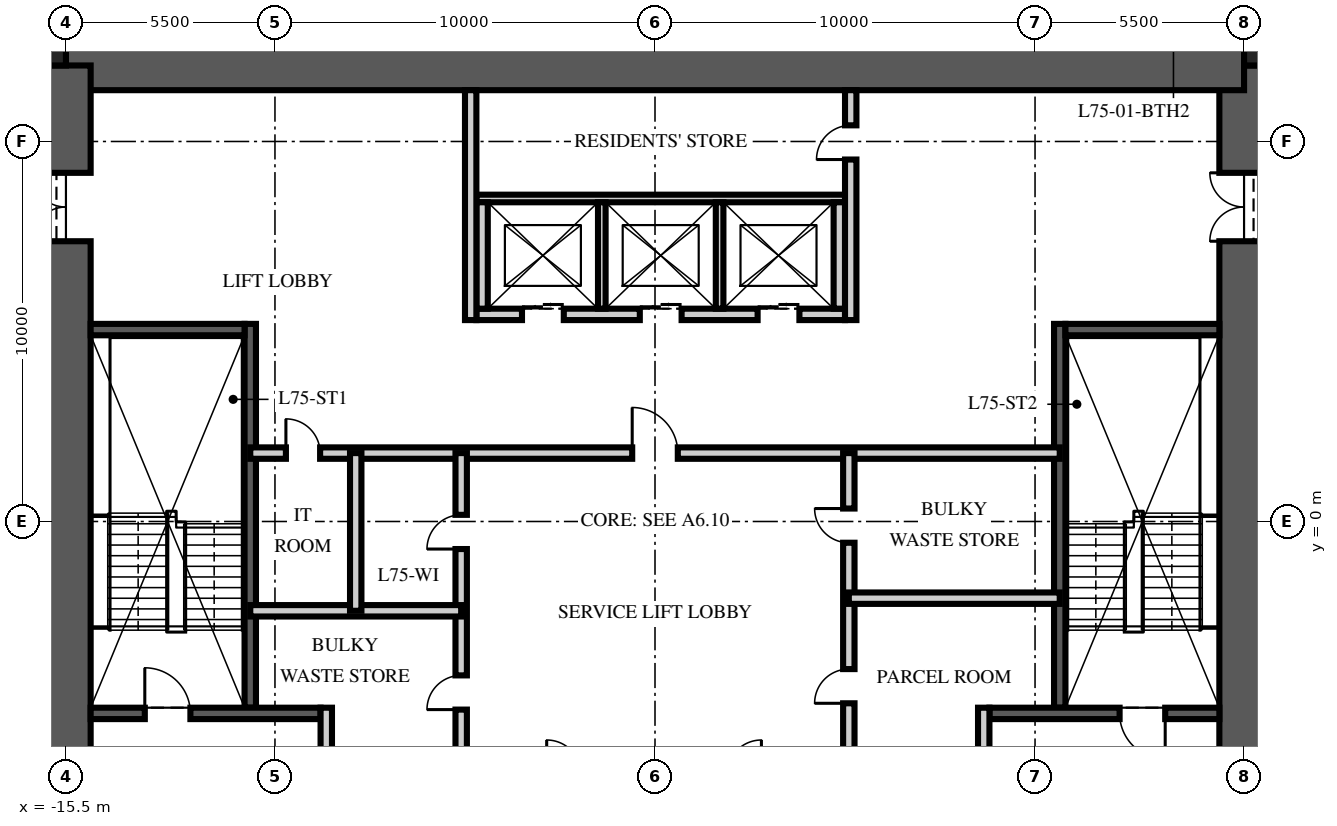
"""IFC4 building model, lengths in metres.
Left out: names, types, materials, properties, quantities, classifications, styles, units other than length and angle.
Written with IfcOpenShell. Run it as: python <this file> out.ifc"""

import sys

from ifc_helpers import new_model, si_unit, direction, frame, frame_2d, origin, origin_2d, place, context, subcontext, project, spatial, rectangle, extrude, element, fill, save


model = new_model("IFC4")
c1 = context("Model", 3, precision=1e-05, world=origin(), true_north=direction((0.0, 1.0)))
c2 = subcontext(c1, "Body", "Model", "MODEL_VIEW")
j1 = project(units=[si_unit("LENGTHUNIT", "METRE"), si_unit("PLANEANGLEUNIT", "RADIAN")], contexts=[c1])
p1 = place(None, origin())
s1 = spatial("IfcSite", under=j1, at=p1, CompositionType="ELEMENT")
p2 = place(p1, origin())
s2 = spatial("IfcBuilding", under=s1, at=p2, CompositionType="ELEMENT")
p3 = place(p2, frame((0.0, 0.0, 300.75)))
s3 = spatial("IfcBuildingStorey", under=s2, at=p3, CompositionType="ELEMENT", Elevation=300.75)
p4 = place(p3, frame((15.5, -12.0, -0.25), z_axis=(0.0, 0.0, 1.0), x_axis=(0.0, 1.0, 0.0)))
e1 = element("IfcWall", 1, at=p4, inside=s3, PredefinedType="SHEAR", context=c2, shape_type="SweptSolid", body=[
    extrude(rectangle(XDim=24.0, YDim=1.3, at=frame_2d((12.0, 0.0))), origin(), (0.0, 0.0, 1.0), 3.75),
])
p5 = place(p4, frame((3.125, 0.0, 0.25)))
e2 = element("IfcOpeningElement", 2, at=p5, cuts=e1, PredefinedType="OPENING", context=c2, shape_type="SweptSolid", body=[
    extrude(rectangle(XDim=1.2, YDim=2.1, at=frame_2d((0.6, 1.05))), frame((0.0, 0.66, 0.0), z_axis=(0.0, -1.0, 0.0), x_axis=(1.0, 0.0, 0.0)), (0.0, 0.0, 1.0), 1.32),
])
p6 = place(p4, frame((19.375, 0.0, 0.25)))
e3 = element("IfcOpeningElement", 3, at=p6, cuts=e1, PredefinedType="OPENING", context=c2, shape_type="SweptSolid", body=[
    extrude(rectangle(XDim=1.8, YDim=2.1, at=frame_2d((0.9, 1.05))), frame((0.0, 0.66, 0.0), z_axis=(0.0, -1.0, 0.0), x_axis=(1.0, 0.0, 0.0)), (0.0, 0.0, 1.0), 1.32),
])
p7 = place(p3, frame((-15.5, 12.0, -0.25), z_axis=(0.0, 0.0, 1.0), x_axis=(1.0, 0.0, 0.0)))
e4 = element("IfcWall", 4, at=p7, inside=s3, PredefinedType="SHEAR", context=c2, shape_type="SweptSolid", body=[
    extrude(rectangle(XDim=31.0, YDim=1.3, at=frame_2d((15.5, 0.0))), origin(), (0.0, 0.0, 1.0), 3.75),
])
p8 = place(p3, frame((-15.5, -12.0, -0.25), z_axis=(0.0, 0.0, 1.0), x_axis=(0.0, 1.0, 0.0)))
e5 = element("IfcWall", 5, at=p8, inside=s3, PredefinedType="SHEAR", context=c2, shape_type="SweptSolid", body=[
    extrude(rectangle(XDim=24.0, YDim=1.3, at=frame_2d((12.0, 0.0))), origin(), (0.0, 0.0, 1.0), 3.75),
])
p9 = place(p8, frame((3.125, 0.0, 0.25)))
e6 = element("IfcOpeningElement", 6, at=p9, cuts=e5, PredefinedType="OPENING", context=c2, shape_type="SweptSolid", body=[
    extrude(rectangle(XDim=1.2, YDim=2.1, at=frame_2d((0.6, 1.05))), frame((0.0, 0.66, 0.0), z_axis=(0.0, -1.0, 0.0), x_axis=(1.0, 0.0, 0.0)), (0.0, 0.0, 1.0), 1.32),
])
p10 = place(p8, frame((19.375, 0.0, 0.25)))
e7 = element("IfcOpeningElement", 7, at=p10, cuts=e5, PredefinedType="OPENING", context=c2, shape_type="SweptSolid", body=[
    extrude(rectangle(XDim=1.8, YDim=2.1, at=frame_2d((0.9, 1.05))), frame((0.0, 0.66, 0.0), z_axis=(0.0, -1.0, 0.0), x_axis=(1.0, 0.0, 0.0)), (0.0, 0.0, 1.0), 1.32),
])
for number, where, z_axis, x_axis in (
    (8, (15.825, 12.325, -0.25), (0.0, 0.0, 1.0), (1.0, 0.0, 0.0)),
    (9, (-15.825, 12.325, -0.25), (0.0, 0.0, 1.0), (1.0, 0.0, 0.0)),
):
    element("IfcColumn", number, at=place(p3, frame(where, z_axis=z_axis, x_axis=x_axis)), inside=s3, PredefinedType="COLUMN", context=c2, shape_type="SweptSolid", body=[
        extrude(rectangle(XDim=0.65, YDim=0.65, at=origin_2d()), origin(), (0.0, 0.0, 1.0), 3.75),
    ])
p11 = place(p3, frame((-10.65, -4.9, 0.0), z_axis=(0.0, 0.0, 1.0), x_axis=(0.0, 1.0, 0.0)))
e10 = element("IfcWall", 10, at=p11, inside=s3, PredefinedType="SOLIDWALL", context=c2, shape_type="SweptSolid", body=[
    extrude(rectangle(XDim=10.1, YDim=0.3, at=frame_2d((5.05, 0.0))), origin(), (0.0, 0.0, 1.0), 3.5),
])
p12 = place(p3, frame((-14.85, -5.05, 0.0), z_axis=(0.0, 0.0, 1.0), x_axis=(1.0, 0.0, 0.0)))
e11 = element("IfcWall", 11, at=p12, inside=s3, PredefinedType="SOLIDWALL", context=c2, shape_type="SweptSolid", body=[
    extrude(rectangle(XDim=6.05, YDim=0.3, at=frame_2d((3.025, 0.0))), origin(), (0.0, 0.0, 1.0), 3.5),
])
p13 = place(p12, frame((1.425, 0.0, 0.0)))
e12 = element("IfcOpeningElement", 12, at=p13, cuts=e11, PredefinedType="OPENING", context=c2, shape_type="SweptSolid", body=[
    extrude(rectangle(XDim=1.2, YDim=2.1, at=frame_2d((0.6, 1.05))), frame((0.0, 0.16, 0.0), z_axis=(0.0, -1.0, 0.0), x_axis=(1.0, 0.0, 0.0)), (0.0, 0.0, 1.0), 0.32),
])
p14 = place(p3, frame((-14.85, 5.05, 0.0), z_axis=(0.0, 0.0, 1.0), x_axis=(1.0, 0.0, 0.0)))
e13 = element("IfcWall", 13, at=p14, inside=s3, PredefinedType="SOLIDWALL", context=c2, shape_type="SweptSolid", body=[
    extrude(rectangle(XDim=4.05, YDim=0.3, at=frame_2d((2.025, 0.0))), origin(), (0.0, 0.0, 1.0), 3.5),
])
p15 = place(p3, frame((-8.65, -11.35, 0.0), z_axis=(0.0, 0.0, 1.0), x_axis=(0.0, 1.0, 0.0)))
e14 = element("IfcWall", 14, at=p15, inside=s3, PredefinedType="PARTITIONING", context=c2, shape_type="SweptSolid", body=[
    extrude(rectangle(XDim=6.45, YDim=0.3, at=frame_2d((3.225, 0.0))), origin(), (0.0, 0.0, 1.0), 3.5),
])
p16 = place(p15, frame((2.6, 0.0, 0.0)))
e15 = element("IfcOpeningElement", 15, at=p16, cuts=e14, PredefinedType="OPENING", context=c2, shape_type="SweptSolid", body=[
    extrude(rectangle(XDim=1.1, YDim=2.1, at=frame_2d((0.55, 1.05))), frame((0.0, 0.16, 0.0), z_axis=(0.0, -1.0, 0.0), x_axis=(1.0, 0.0, 0.0)), (0.0, 0.0, 1.0), 0.32),
])
p17 = place(p3, frame((10.65, -4.9, 0.0), z_axis=(0.0, 0.0, 1.0), x_axis=(0.0, 1.0, 0.0)))
e16 = element("IfcWall", 16, at=p17, inside=s3, PredefinedType="SOLIDWALL", context=c2, shape_type="SweptSolid", body=[
    extrude(rectangle(XDim=10.1, YDim=0.3, at=frame_2d((5.05, 0.0))), origin(), (0.0, 0.0, 1.0), 3.5),
])
p18 = place(p3, frame((14.85, -5.05, 0.0), z_axis=(0.0, 0.0, 1.0), x_axis=(-1.0, 0.0, 0.0)))
e17 = element("IfcWall", 17, at=p18, inside=s3, PredefinedType="SOLIDWALL", context=c2, shape_type="SweptSolid", body=[
    extrude(rectangle(XDim=6.05, YDim=0.3, at=frame_2d((3.025, 0.0))), origin(), (0.0, 0.0, 1.0), 3.5),
])
p19 = place(p18, frame((1.425, 0.0, 0.0)))
e18 = element("IfcOpeningElement", 18, at=p19, cuts=e17, PredefinedType="OPENING", context=c2, shape_type="SweptSolid", body=[
    extrude(rectangle(XDim=1.2, YDim=2.1, at=frame_2d((0.6, 1.05))), frame((0.0, 0.16, 0.0), z_axis=(0.0, -1.0, 0.0), x_axis=(1.0, 0.0, 0.0)), (0.0, 0.0, 1.0), 0.32),
])
p20 = place(p3, frame((14.85, 5.05, 0.0), z_axis=(0.0, 0.0, 1.0), x_axis=(-1.0, 0.0, 0.0)))
e19 = element("IfcWall", 19, at=p20, inside=s3, PredefinedType="SOLIDWALL", context=c2, shape_type="SweptSolid", body=[
    extrude(rectangle(XDim=4.05, YDim=0.3, at=frame_2d((2.025, 0.0))), origin(), (0.0, 0.0, 1.0), 3.5),
])
p21 = place(p3, frame((8.65, -11.35, 0.0), z_axis=(0.0, 0.0, 1.0), x_axis=(0.0, 1.0, 0.0)))
e20 = element("IfcWall", 20, at=p21, inside=s3, PredefinedType="PARTITIONING", context=c2, shape_type="SweptSolid", body=[
    extrude(rectangle(XDim=6.45, YDim=0.3, at=frame_2d((3.225, 0.0))), origin(), (0.0, 0.0, 1.0), 3.5),
])
p22 = place(p21, frame((2.6, 0.0, 0.0)))
e21 = element("IfcOpeningElement", 21, at=p22, cuts=e20, PredefinedType="OPENING", context=c2, shape_type="SweptSolid", body=[
    extrude(rectangle(XDim=1.1, YDim=2.1, at=frame_2d((0.55, 1.05))), frame((0.0, 0.16, 0.0), z_axis=(0.0, -1.0, 0.0), x_axis=(1.0, 0.0, 0.0)), (0.0, 0.0, 1.0), 0.32),
])
p23 = place(p3, frame((-4.7, 5.45, 0.0), z_axis=(0.0, 0.0, 1.0), x_axis=(1.0, 0.0, 0.0)))
e22 = element("IfcWall", 22, at=p23, inside=s3, PredefinedType="PARTITIONING", context=c2, shape_type="SweptSolid", body=[
    extrude(rectangle(XDim=9.7, YDim=0.3, at=frame_2d((4.85, 0.0))), origin(), (0.0, 0.0, 1.0), 3.5),
])
p24 = place(p23, frame((1.2, 0.0, 0.0)))
e23 = element("IfcOpeningElement", 23, at=p24, cuts=e22, PredefinedType="OPENING", context=c2, shape_type="SweptSolid", body=[
    extrude(rectangle(XDim=1.1, YDim=2.1, at=frame_2d((0.55, 1.05))), frame((0.0, 0.16, 0.0), z_axis=(0.0, -1.0, 0.0), x_axis=(1.0, 0.0, 0.0)), (0.0, 0.0, 1.0), 0.32),
])
p25 = place(p23, frame((4.3, 0.0, 0.0)))
e24 = element("IfcOpeningElement", 24, at=p25, cuts=e22, PredefinedType="OPENING", context=c2, shape_type="SweptSolid", body=[
    extrude(rectangle(XDim=1.1, YDim=2.1, at=frame_2d((0.55, 1.05))), frame((0.0, 0.16, 0.0), z_axis=(0.0, -1.0, 0.0), x_axis=(1.0, 0.0, 0.0)), (0.0, 0.0, 1.0), 0.32),
])
p26 = place(p23, frame((7.4, 0.0, 0.0)))
e25 = element("IfcOpeningElement", 25, at=p26, cuts=e22, PredefinedType="OPENING", context=c2, shape_type="SweptSolid", body=[
    extrude(rectangle(XDim=1.1, YDim=2.1, at=frame_2d((0.55, 1.05))), frame((0.0, 0.16, 0.0), z_axis=(0.0, -1.0, 0.0), x_axis=(1.0, 0.0, 0.0)), (0.0, 0.0, 1.0), 0.32),
])
p27 = place(p3, frame((-4.7, 8.5, 0.0), z_axis=(0.0, 0.0, 1.0), x_axis=(1.0, 0.0, 0.0)))
e26 = element("IfcWall", 26, at=p27, inside=s3, PredefinedType="PARTITIONING", context=c2, shape_type="SweptSolid", body=[
    extrude(rectangle(XDim=9.7, YDim=0.2, at=frame_2d((4.85, 0.0))), origin(), (0.0, 0.0, 1.0), 3.5),
])
for number, where, z_axis, x_axis in (
    (27, (-4.55, 5.6, 0.0), (0.0, 0.0, 1.0), (0.0, 1.0, 0.0)),
    (28, (4.85, 5.6, 0.0), (0.0, 0.0, 1.0), (0.0, 1.0, 0.0)),
):
    element("IfcWall", number, at=place(p3, frame(where, z_axis=z_axis, x_axis=x_axis)), inside=s3, PredefinedType="PARTITIONING", context=c2, shape_type="SweptSolid", body=[
        extrude(rectangle(XDim=2.8, YDim=0.3, at=frame_2d((1.4, 0.0))), origin(), (0.0, 0.0, 1.0), 3.5),
    ])
for number, where, z_axis, x_axis in (
    (29, (-1.4, 5.6, 0.0), (0.0, 0.0, 1.0), (0.0, 1.0, 0.0)),
    (30, (1.7, 5.6, 0.0), (0.0, 0.0, 1.0), (0.0, 1.0, 0.0)),
):
    element("IfcWall", number, at=place(p3, frame(where, z_axis=z_axis, x_axis=x_axis)), inside=s3, PredefinedType="PARTITIONING", context=c2, shape_type="SweptSolid", body=[
        extrude(rectangle(XDim=2.8, YDim=0.2, at=frame_2d((1.4, 0.0))), origin(), (0.0, 0.0, 1.0), 3.5),
    ])
p28 = place(p3, frame((-10.65, 1.8, 0.0), z_axis=(0.0, 0.0, 1.0), x_axis=(1.0, 0.0, 0.0)))
e31 = element("IfcWall", 31, at=p28, inside=s3, PredefinedType="PARTITIONING", context=c2, shape_type="SweptSolid", body=[
    extrude(rectangle(XDim=21.3, YDim=0.3, at=frame_2d((10.65, 0.0))), origin(), (0.0, 0.0, 1.0), 3.5),
])
p29 = place(p28, frame((10.05, 0.0, 0.0)))
e32 = element("IfcOpeningElement", 32, at=p29, cuts=e31, PredefinedType="OPENING", context=c2, shape_type="SweptSolid", body=[
    extrude(rectangle(XDim=1.2, YDim=2.1, at=frame_2d((0.6, 1.05))), frame((0.0, 0.16, 0.0), z_axis=(0.0, -1.0, 0.0), x_axis=(1.0, 0.0, 0.0)), (0.0, 0.0, 1.0), 0.32),
])
p30 = place(p28, frame((0.938, 0.0, 0.0)))
e33 = element("IfcOpeningElement", 33, at=p30, cuts=e31, PredefinedType="OPENING", context=c2, shape_type="SweptSolid", body=[
    extrude(rectangle(XDim=0.9, YDim=2.1, at=frame_2d((0.45, 1.05))), frame((0.0, 0.16, 0.0), z_axis=(0.0, -1.0, 0.0), x_axis=(1.0, 0.0, 0.0)), (0.0, 0.0, 1.0), 0.32),
])
p31 = place(p3, frame((-5.1, -6.65, 0.0), z_axis=(0.0, 0.0, 1.0), x_axis=(0.0, 1.0, 0.0)))
e34 = element("IfcWall", 34, at=p31, inside=s3, PredefinedType="PARTITIONING", context=c2, shape_type="SweptSolid", body=[
    extrude(rectangle(XDim=8.45, YDim=0.3, at=frame_2d((4.225, 0.0))), origin(), (0.0, 0.0, 1.0), 3.5),
])
p32 = place(p31, frame((1.7, 0.0, 0.0)))
e35 = element("IfcOpeningElement", 35, at=p32, cuts=e34, PredefinedType="OPENING", context=c2, shape_type="SweptSolid", body=[
    extrude(rectangle(XDim=0.9, YDim=2.1, at=frame_2d((0.45, 1.05))), frame((0.0, 0.16, 0.0), z_axis=(0.0, -1.0, 0.0), x_axis=(1.0, 0.0, 0.0)), (0.0, 0.0, 1.0), 0.32),
])
p33 = place(p31, frame((5.925, 0.0, 0.0)))
e36 = element("IfcOpeningElement", 36, at=p33, cuts=e34, PredefinedType="OPENING", context=c2, shape_type="SweptSolid", body=[
    extrude(rectangle(XDim=0.9, YDim=2.1, at=frame_2d((0.45, 1.05))), frame((0.0, 0.16, 0.0), z_axis=(0.0, -1.0, 0.0), x_axis=(1.0, 0.0, 0.0)), (0.0, 0.0, 1.0), 0.32),
])
p34 = place(p3, frame((5.1, -6.65, 0.0), z_axis=(0.0, 0.0, 1.0), x_axis=(0.0, 1.0, 0.0)))
e37 = element("IfcWall", 37, at=p34, inside=s3, PredefinedType="PARTITIONING", context=c2, shape_type="SweptSolid", body=[
    extrude(rectangle(XDim=8.45, YDim=0.3, at=frame_2d((4.225, 0.0))), origin(), (0.0, 0.0, 1.0), 3.5),
])
p35 = place(p34, frame((1.866, 0.0, 0.0)))
e38 = element("IfcOpeningElement", 38, at=p35, cuts=e37, PredefinedType="OPENING", context=c2, shape_type="SweptSolid", body=[
    extrude(rectangle(XDim=0.9, YDim=2.1, at=frame_2d((0.45, 1.05))), frame((0.0, 0.16, 0.0), z_axis=(0.0, -1.0, 0.0), x_axis=(1.0, 0.0, 0.0)), (0.0, 0.0, 1.0), 0.32),
])
p36 = place(p34, frame((6.091, 0.0, 0.0)))
e39 = element("IfcOpeningElement", 39, at=p36, cuts=e37, PredefinedType="OPENING", context=c2, shape_type="SweptSolid", body=[
    extrude(rectangle(XDim=0.9, YDim=2.1, at=frame_2d((0.45, 1.05))), frame((0.0, 0.16, 0.0), z_axis=(0.0, -1.0, 0.0), x_axis=(1.0, 0.0, 0.0)), (0.0, 0.0, 1.0), 0.32),
])
p37 = place(p3, frame((-10.65, -2.35, 0.0), z_axis=(0.0, 0.0, 1.0), x_axis=(1.0, 0.0, 0.0)))
e40 = element("IfcWall", 40, at=p37, inside=s3, PredefinedType="PARTITIONING", context=c2, shape_type="SweptSolid", body=[
    extrude(rectangle(XDim=5.55, YDim=0.3, at=frame_2d((2.775, 0.0))), origin(), (0.0, 0.0, 1.0), 3.5),
])
p38 = place(p3, frame((-7.875, -2.35, 0.0), z_axis=(0.0, 0.0, 1.0), x_axis=(0.0, 1.0, 0.0)))
e41 = element("IfcWall", 41, at=p38, inside=s3, PredefinedType="PARTITIONING", context=c2, shape_type="SweptSolid", body=[
    extrude(rectangle(XDim=4.15, YDim=0.3, at=frame_2d((2.075, 0.0))), origin(), (0.0, 0.0, 1.0), 3.5),
])
p39 = place(p3, frame((10.65, -2.018, 0.0), z_axis=(0.0, 0.0, 1.0), x_axis=(-1.0, 0.0, 0.0)))
e42 = element("IfcWall", 42, at=p39, inside=s3, PredefinedType="PARTITIONING", context=c2, shape_type="SweptSolid", body=[
    extrude(rectangle(XDim=5.55, YDim=0.3, at=frame_2d((2.775, 0.0))), origin(), (0.0, 0.0, 1.0), 3.5),
])
p40 = place(p3, frame((-4.85, 5.3, 0.0), z_axis=(0.0, 0.0, 1.0), x_axis=(0.0, 1.0, 0.0)))
e43 = element("IfcWall", 43, at=p40, inside=s3, PredefinedType="PARTITIONING", context=c2, shape_type="SweptSolid", body=[
    extrude(rectangle(XDim=6.05, YDim=0.3, at=frame_2d((3.025, 0.0))), origin(), (0.0, 0.0, 1.0), 3.5),
])
p41 = place(p3, frame((5.15, 5.3, 0.0), z_axis=(0.0, 0.0, 1.0), x_axis=(0.0, 1.0, 0.0)))
e44 = element("IfcWall", 44, at=p41, inside=s3, PredefinedType="PARTITIONING", context=c2, shape_type="SweptSolid", body=[
    extrude(rectangle(XDim=6.05, YDim=0.3, at=frame_2d((3.025, 0.0))), origin(), (0.0, 0.0, 1.0), 3.5),
])
p42 = place(p41, frame((4.225, 0.0, 0.0)))
e45 = element("IfcOpeningElement", 45, at=p42, cuts=e44, PredefinedType="OPENING", context=c2, shape_type="SweptSolid", body=[
    extrude(rectangle(XDim=0.9, YDim=2.1, at=frame_2d((0.45, 1.05))), frame((0.0, 0.16, 0.0), z_axis=(0.0, -1.0, 0.0), x_axis=(1.0, 0.0, 0.0)), (0.0, 0.0, 1.0), 0.32),
])
p43 = place(p13, origin())
e46 = element("IfcDoor", 46, at=p43, inside=s3, OperationType="SINGLE_SWING_LEFT", PredefinedType="DOOR", context=c2, shape_type="SweptSolid", body=[
    extrude(rectangle(XDim=1.2, YDim=2.1, at=frame_2d((0.6, 1.05))), frame((0.0, 0.025, 0.0), z_axis=(0.0, -1.0, 0.0), x_axis=(1.0, 0.0, 0.0)), (0.0, 0.0, 1.0), 0.05),
])
fill(e12, e46)
p44 = place(p10, origin())
e47 = element("IfcDoor", 47, at=p44, inside=s3, OperationType="DOUBLE_DOOR_SINGLE_SWING", PredefinedType="DOOR", context=c2, shape_type="SweptSolid", body=[
    extrude(rectangle(XDim=1.8, YDim=2.1, at=frame_2d((0.9, 1.05))), frame((0.0, 0.025, 0.0), z_axis=(0.0, -1.0, 0.0), x_axis=(1.0, 0.0, 0.0)), (0.0, 0.0, 1.0), 0.05),
])
fill(e7, e47)
p45 = place(p19, origin())
e48 = element("IfcDoor", 48, at=p45, inside=s3, OperationType="SINGLE_SWING_LEFT", PredefinedType="DOOR", context=c2, shape_type="SweptSolid", body=[
    extrude(rectangle(XDim=1.2, YDim=2.1, at=frame_2d((0.6, 1.05))), frame((0.0, 0.025, 0.0), z_axis=(0.0, -1.0, 0.0), x_axis=(1.0, 0.0, 0.0)), (0.0, 0.0, 1.0), 0.05),
])
fill(e18, e48)
p46 = place(p6, origin())
e49 = element("IfcDoor", 49, at=p46, inside=s3, OperationType="DOUBLE_DOOR_SINGLE_SWING", PredefinedType="DOOR", context=c2, shape_type="SweptSolid", body=[
    extrude(rectangle(XDim=1.8, YDim=2.1, at=frame_2d((0.9, 1.05))), frame((0.0, 0.025, 0.0), z_axis=(0.0, -1.0, 0.0), x_axis=(1.0, 0.0, 0.0)), (0.0, 0.0, 1.0), 0.05),
])
fill(e3, e49)
p47 = place(p24, origin())
e50 = element("IfcDoor", 50, at=p47, inside=s3, OperationType="DOUBLE_DOOR_SLIDING", PredefinedType="DOOR", context=c2, shape_type="SweptSolid", body=[
    extrude(rectangle(XDim=1.1, YDim=2.1, at=frame_2d((0.55, 1.05))), frame((0.0, 0.025, 0.0), z_axis=(0.0, -1.0, 0.0), x_axis=(1.0, 0.0, 0.0)), (0.0, 0.0, 1.0), 0.05),
])
fill(e23, e50)
p48 = place(p25, origin())
e51 = element("IfcDoor", 51, at=p48, inside=s3, OperationType="DOUBLE_DOOR_SLIDING", PredefinedType="DOOR", context=c2, shape_type="SweptSolid", body=[
    extrude(rectangle(XDim=1.1, YDim=2.1, at=frame_2d((0.55, 1.05))), frame((0.0, 0.025, 0.0), z_axis=(0.0, -1.0, 0.0), x_axis=(1.0, 0.0, 0.0)), (0.0, 0.0, 1.0), 0.05),
])
fill(e24, e51)
p49 = place(p26, origin())
e52 = element("IfcDoor", 52, at=p49, inside=s3, OperationType="DOUBLE_DOOR_SLIDING", PredefinedType="DOOR", context=c2, shape_type="SweptSolid", body=[
    extrude(rectangle(XDim=1.1, YDim=2.1, at=frame_2d((0.55, 1.05))), frame((0.0, 0.025, 0.0), z_axis=(0.0, -1.0, 0.0), x_axis=(1.0, 0.0, 0.0)), (0.0, 0.0, 1.0), 0.05),
])
fill(e25, e52)
p50 = place(p29, origin())
e53 = element("IfcDoor", 53, at=p50, inside=s3, OperationType="SINGLE_SWING_LEFT", PredefinedType="DOOR", context=c2, shape_type="SweptSolid", body=[
    extrude(rectangle(XDim=1.2, YDim=2.1, at=frame_2d((0.6, 1.05))), frame((0.0, 0.025, 0.0), z_axis=(0.0, -1.0, 0.0), x_axis=(1.0, 0.0, 0.0)), (0.0, 0.0, 1.0), 0.05),
])
fill(e32, e53)
p51 = place(p32, origin())
e54 = element("IfcDoor", 54, at=p51, inside=s3, OperationType="SINGLE_SWING_LEFT", PredefinedType="DOOR", context=c2, shape_type="SweptSolid", body=[
    extrude(rectangle(XDim=0.9, YDim=2.1, at=frame_2d((0.45, 1.05))), frame((0.0, 0.025, 0.0), z_axis=(0.0, -1.0, 0.0), x_axis=(1.0, 0.0, 0.0)), (0.0, 0.0, 1.0), 0.05),
])
fill(e35, e54)
p52 = place(p33, origin())
e55 = element("IfcDoor", 55, at=p52, inside=s3, OperationType="SINGLE_SWING_LEFT", PredefinedType="DOOR", context=c2, shape_type="SweptSolid", body=[
    extrude(rectangle(XDim=0.9, YDim=2.1, at=frame_2d((0.45, 1.05))), frame((0.0, 0.025, 0.0), z_axis=(0.0, -1.0, 0.0), x_axis=(1.0, 0.0, 0.0)), (0.0, 0.0, 1.0), 0.05),
])
fill(e36, e55)
p53 = place(p30, origin())
e56 = element("IfcDoor", 56, at=p53, inside=s3, OperationType="SINGLE_SWING_LEFT", PredefinedType="DOOR", context=c2, shape_type="SweptSolid", body=[
    extrude(rectangle(XDim=0.9, YDim=2.1, at=frame_2d((0.45, 1.05))), frame((0.0, 0.025, 0.0), z_axis=(0.0, -1.0, 0.0), x_axis=(1.0, 0.0, 0.0)), (0.0, 0.0, 1.0), 0.05),
])
fill(e33, e56)
p54 = place(p35, origin())
e57 = element("IfcDoor", 57, at=p54, inside=s3, OperationType="SINGLE_SWING_LEFT", PredefinedType="DOOR", context=c2, shape_type="SweptSolid", body=[
    extrude(rectangle(XDim=0.9, YDim=2.1, at=frame_2d((0.45, 1.05))), frame((0.0, 0.025, 0.0), z_axis=(0.0, -1.0, 0.0), x_axis=(1.0, 0.0, 0.0)), (0.0, 0.0, 1.0), 0.05),
])
fill(e38, e57)
p55 = place(p36, origin())
e58 = element("IfcDoor", 58, at=p55, inside=s3, OperationType="SINGLE_SWING_RIGHT", PredefinedType="DOOR", context=c2, shape_type="SweptSolid", body=[
    extrude(rectangle(XDim=0.9, YDim=2.1, at=frame_2d((0.45, 1.05))), frame((0.0, 0.025, 0.0), z_axis=(0.0, -1.0, 0.0), x_axis=(1.0, 0.0, 0.0)), (0.0, 0.0, 1.0), 0.05),
])
fill(e39, e58)
p56 = place(p42, origin())
e59 = element("IfcDoor", 59, at=p56, inside=s3, OperationType="SINGLE_SWING_LEFT", PredefinedType="DOOR", context=c2, shape_type="SweptSolid", body=[
    extrude(rectangle(XDim=0.9, YDim=2.1, at=frame_2d((0.45, 1.05))), frame((0.0, 0.025, 0.0), z_axis=(0.0, -1.0, 0.0), x_axis=(1.0, 0.0, 0.0)), (0.0, 0.0, 1.0), 0.05),
])
fill(e45, e59)
save(model, sys.argv[1])
